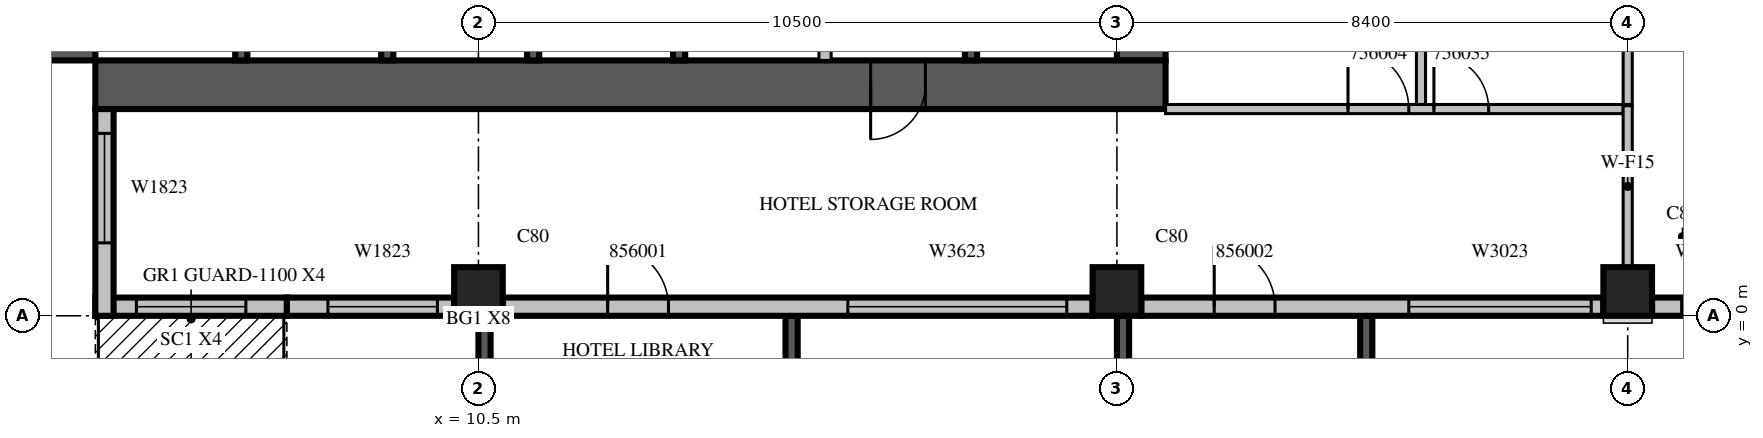
"""IFC4 building model, lengths in metres.
Left out: names, types, materials, properties, quantities, classifications, styles, units other than length and angle.
Written with IfcOpenShell. Run it as: python <this file> out.ifc"""

import sys

from ifc_helpers import new_model, si_unit, direction, frame, frame_2d, origin, origin_2d, place, context, subcontext, project, spatial, rectangle, extrude, source, transform, mapped, element, fill, save


model = new_model("IFC4")
c1 = context("Model", 3, precision=1e-05, world=origin(), true_north=direction((0.0, 1.0)))
c2 = subcontext(c1, "Body", "Model", "MODEL_VIEW")
j1 = project(units=[si_unit("LENGTHUNIT", "METRE"), si_unit("PLANEANGLEUNIT", "RADIAN")], contexts=[c1])
p1 = place(None, origin())
s1 = spatial("IfcSite", under=j1, at=p1, CompositionType="ELEMENT")
p2 = place(p1, origin())
s2 = spatial("IfcBuilding", under=s1, at=p2, CompositionType="ELEMENT")
p3 = place(p2, frame((0.0, 0.0, 246.2)))
s3 = spatial("IfcBuildingStorey", under=s2, at=p3, CompositionType="ELEMENT", Elevation=246.2)
m1 = source(origin(), c2, "Body", "SweptSolid", [
    extrude(rectangle(XDim=0.8, YDim=0.8, at=origin_2d()), origin(), (0.0, 0.0, 1.0), 3.8),
])
for number, where, z_axis, x_axis in (
    (1, (10.5, 0.4, 0.0), (0.0, 0.0, 1.0), (1.0, 0.0, 0.0)),
    (2, (21.0, 0.4, 0.0), (0.0, 0.0, 1.0), (1.0, 0.0, 0.0)),
    (3, (29.4, 0.4, 0.0), (0.0, 0.0, 1.0), (1.0, 0.0, 0.0)),
):
    element("IfcColumn", number, at=place(p3, frame(where, z_axis=z_axis, x_axis=x_axis)), inside=s3, PredefinedType="COLUMN", context=c2, shape_type="MappedRepresentation", body=[
        mapped(m1, transform((0.0, 0.0, 0.0), scale=1.0)),
    ])
m2 = source(origin(), c2, "Body", "SweptSolid", [
    extrude(rectangle(XDim=17.6, YDim=0.8, at=frame_2d((8.8, 0.0))), origin(), (0.0, 0.0, 1.0), 3.8),
])
p4 = place(p3, frame((3.8, 4.2, 0.0), z_axis=(0.0, 0.0, 1.0), x_axis=(0.0, 1.0, 0.0)))
e4 = element("IfcWall", 4, at=p4, inside=s3, PredefinedType="SHEAR", context=c2, shape_type="MappedRepresentation", body=[
    mapped(m2, transform((0.0, 0.0, 0.0), scale=1.0)),
])
m3 = source(origin(), c2, "Body", "SweptSolid", [
    extrude(rectangle(XDim=2.2, YDim=2.1, at=frame_2d((1.1, 1.05))), frame((0.0, 0.41, 0.0), z_axis=(0.0, -1.0, 0.0), x_axis=(1.0, 0.0, 0.0)), (0.0, 0.0, 1.0), 0.82),
])
p5 = place(p4, frame((4.2, 0.0, 0.0)))
e5 = element("IfcOpeningElement", 5, at=p5, cuts=e4, PredefinedType="OPENING", context=c2, shape_type="MappedRepresentation", body=[
    mapped(m3, transform((0.0, 0.0, 0.0), scale=1.0)),
])
m4 = source(origin(), c2, "Body", "SweptSolid", [
    extrude(rectangle(XDim=0.9, YDim=2.1, at=frame_2d((0.45, 1.05))), frame((0.0, 0.41, 0.0), z_axis=(0.0, -1.0, 0.0), x_axis=(1.0, 0.0, 0.0)), (0.0, 0.0, 1.0), 0.82),
])
p6 = place(p4, frame((10.95, 0.0, 0.0)))
e6 = element("IfcOpeningElement", 6, at=p6, cuts=e4, PredefinedType="OPENING", context=c2, shape_type="MappedRepresentation", body=[
    mapped(m4, transform((0.0, 0.0, 0.0), scale=1.0)),
])
m5 = source(origin(), c2, "Body", "SweptSolid", [
    extrude(rectangle(XDim=16.8, YDim=0.8, at=frame_2d((8.4, 0.0))), origin(), (0.0, 0.0, 1.0), 3.8),
])
p7 = place(p3, frame((21.4, 4.2, 0.0), z_axis=(0.0, 0.0, 1.0), x_axis=(0.0, 1.0, 0.0)))
e7 = element("IfcWall", 7, at=p7, inside=s3, PredefinedType="SHEAR", context=c2, shape_type="MappedRepresentation", body=[
    mapped(m5, transform((0.0, 0.0, 0.0), scale=1.0)),
])
p8 = place(p7, frame((4.2, 0.0, 0.0)))
e8 = element("IfcOpeningElement", 8, at=p8, cuts=e7, PredefinedType="OPENING", context=c2, shape_type="MappedRepresentation", body=[
    mapped(m3, transform((0.0, 0.0, 0.0), scale=1.0)),
])
m6 = source(origin(), c2, "Body", "SweptSolid", [
    extrude(rectangle(XDim=1.2, YDim=2.1, at=frame_2d((0.6, 1.05))), frame((0.0, 0.41, 0.0), z_axis=(0.0, -1.0, 0.0), x_axis=(1.0, 0.0, 0.0)), (0.0, 0.0, 1.0), 0.82),
])
p9 = place(p7, frame((14.7, 0.0, 0.0)))
e9 = element("IfcOpeningElement", 9, at=p9, cuts=e7, PredefinedType="OPENING", context=c2, shape_type="MappedRepresentation", body=[
    mapped(m6, transform((0.0, 0.0, 0.0), scale=1.0)),
])
p10 = place(p3, frame((4.2, 3.8, 0.0), z_axis=(0.0, 0.0, 1.0), x_axis=(1.0, 0.0, 0.0)))
e10 = element("IfcWall", 10, at=p10, inside=s3, PredefinedType="SHEAR", context=c2, shape_type="MappedRepresentation", body=[
    mapped(m2, transform((0.0, 0.0, 0.0), scale=1.0)),
])
p11 = place(p10, frame((12.75, 0.0, 0.0)))
e11 = element("IfcOpeningElement", 11, at=p11, cuts=e10, PredefinedType="OPENING", context=c2, shape_type="MappedRepresentation", body=[
    mapped(m4, transform((0.0, 0.0, 0.0), scale=1.0)),
])
m7 = source(origin(), c2, "Body", "SweptSolid", [
    extrude(rectangle(XDim=3.9, YDim=0.2, at=frame_2d((1.95, 0.0))), origin(), (0.0, 0.0, 1.0), 3.4),
])
p12 = place(p3, frame((10.6, 0.0, 0.0), z_axis=(0.0, 0.0, 1.0), x_axis=(0.0, -1.0, 0.0)))
e12 = element("IfcWall", 12, at=p12, inside=s3, PredefinedType="SOLIDWALL", context=c2, shape_type="MappedRepresentation", body=[
    mapped(m7, transform((0.0, 0.0, 0.0), scale=1.0)),
])
m8 = source(origin(), c2, "Body", "SweptSolid", [
    extrude(rectangle(XDim=2.4, YDim=2.3, at=frame_2d((1.2, 1.15))), frame((0.0, 0.11, 0.0), z_axis=(0.0, -1.0, 0.0), x_axis=(1.0, 0.0, 0.0)), (0.0, 0.0, 1.0), 0.22),
])
p13 = place(p12, frame((0.75, 0.0, 0.6)))
e13 = element("IfcOpeningElement", 13, at=p13, cuts=e12, PredefinedType="OPENING", context=c2, shape_type="MappedRepresentation", body=[
    mapped(m8, transform((0.0, 0.0, 0.0), scale=1.0)),
])
p14 = place(p3, frame((15.65, 0.0, 0.0), z_axis=(0.0, 0.0, 1.0), x_axis=(0.0, -1.0, 0.0)))
e14 = element("IfcWall", 14, at=p14, inside=s3, PredefinedType="SOLIDWALL", context=c2, shape_type="MappedRepresentation", body=[
    mapped(m7, transform((0.0, 0.0, 0.0), scale=1.0)),
])
p15 = place(p14, frame((0.75, 0.0, 0.6)))
e15 = element("IfcOpeningElement", 15, at=p15, cuts=e14, PredefinedType="OPENING", context=c2, shape_type="MappedRepresentation", body=[
    mapped(m8, transform((0.0, 0.0, 0.0), scale=1.0)),
])
p16 = place(p3, frame((21.1, 0.0, 0.0), z_axis=(0.0, 0.0, 1.0), x_axis=(0.0, -1.0, 0.0)))
e16 = element("IfcWall", 16, at=p16, inside=s3, PredefinedType="SOLIDWALL", context=c2, shape_type="MappedRepresentation", body=[
    mapped(m7, transform((0.0, 0.0, 0.0), scale=1.0)),
])
p17 = place(p16, frame((0.75, 0.0, 0.6)))
e17 = element("IfcOpeningElement", 17, at=p17, cuts=e16, PredefinedType="OPENING", context=c2, shape_type="MappedRepresentation", body=[
    mapped(m8, transform((0.0, 0.0, 0.0), scale=1.0)),
])
p18 = place(p3, frame((25.1, 0.0, 0.0), z_axis=(0.0, 0.0, 1.0), x_axis=(0.0, -1.0, 0.0)))
e18 = element("IfcWall", 18, at=p18, inside=s3, PredefinedType="SOLIDWALL", context=c2, shape_type="MappedRepresentation", body=[
    mapped(m7, transform((0.0, 0.0, 0.0), scale=1.0)),
])
p19 = place(p18, frame((0.75, 0.0, 0.6)))
e19 = element("IfcOpeningElement", 19, at=p19, cuts=e18, PredefinedType="OPENING", context=c2, shape_type="MappedRepresentation", body=[
    mapped(m8, transform((0.0, 0.0, 0.0), scale=1.0)),
])
m9 = source(origin(), c2, "Body", "SweptSolid", [
    extrude(rectangle(XDim=3.15, YDim=0.3, at=frame_2d((1.575, 0.0))), origin(), (0.0, 0.0, 1.0), 3.4),
])
p20 = place(p3, frame((4.2, 0.15, 0.0), z_axis=(0.0, 0.0, 1.0), x_axis=(1.0, 0.0, 0.0)))
e20 = element("IfcWall", 20, at=p20, inside=s3, PredefinedType="STANDARD", context=c2, shape_type="MappedRepresentation", body=[
    mapped(m9, transform((0.0, 0.0, 0.0), scale=1.0)),
])
m10 = source(origin(), c2, "Body", "SweptSolid", [
    extrude(rectangle(XDim=1.8, YDim=2.4, at=frame_2d((0.9, 1.2))), frame((0.0, 0.16, 0.0), z_axis=(0.0, -1.0, 0.0), x_axis=(1.0, 0.0, 0.0)), (0.0, 0.0, 1.0), 0.32),
])
p21 = place(p20, frame((0.675, 0.0, 0.0)))
e21 = element("IfcOpeningElement", 21, at=p21, cuts=e20, PredefinedType="OPENING", context=c2, shape_type="MappedRepresentation", body=[
    mapped(m10, transform((0.0, 0.0, 0.0), scale=1.0)),
])
m11 = source(origin(), c2, "Body", "SweptSolid", [
    extrude(rectangle(XDim=2.75, YDim=0.3, at=frame_2d((1.375, 0.0))), origin(), (0.0, 0.0, 1.0), 3.4),
])
p22 = place(p3, frame((7.35, 0.15, 0.0), z_axis=(0.0, 0.0, 1.0), x_axis=(1.0, 0.0, 0.0)))
e22 = element("IfcWall", 22, at=p22, inside=s3, PredefinedType="STANDARD", context=c2, shape_type="MappedRepresentation", body=[
    mapped(m11, transform((0.0, 0.0, 0.0), scale=1.0)),
])
m12 = source(origin(), c2, "Body", "SweptSolid", [
    extrude(rectangle(XDim=1.8, YDim=2.3, at=frame_2d((0.9, 1.15))), frame((0.0, 0.16, 0.0), z_axis=(0.0, -1.0, 0.0), x_axis=(1.0, 0.0, 0.0)), (0.0, 0.0, 1.0), 0.32),
])
p23 = place(p22, frame((0.675, 0.0, 0.6)))
e23 = element("IfcOpeningElement", 23, at=p23, cuts=e22, PredefinedType="OPENING", context=c2, shape_type="MappedRepresentation", body=[
    mapped(m12, transform((0.0, 0.0, 0.0), scale=1.0)),
])
m13 = source(origin(), c2, "Body", "SweptSolid", [
    extrude(rectangle(XDim=9.7, YDim=0.3, at=frame_2d((4.85, 0.0))), origin(), (0.0, 0.0, 1.0), 3.4),
])
p24 = place(p3, frame((10.9, 0.15, 0.0), z_axis=(0.0, 0.0, 1.0), x_axis=(1.0, 0.0, 0.0)))
e24 = element("IfcWall", 24, at=p24, inside=s3, PredefinedType="STANDARD", context=c2, shape_type="MappedRepresentation", body=[
    mapped(m13, transform((0.0, 0.0, 0.0), scale=1.0)),
])
m14 = source(origin(), c2, "Body", "SweptSolid", [
    extrude(rectangle(XDim=3.6, YDim=2.3, at=frame_2d((1.8, 1.15))), frame((0.0, 0.16, 0.0), z_axis=(0.0, -1.0, 0.0), x_axis=(1.0, 0.0, 0.0)), (0.0, 0.0, 1.0), 0.32),
])
p25 = place(p24, frame((5.675, 0.0, 0.6)))
e25 = element("IfcOpeningElement", 25, at=p25, cuts=e24, PredefinedType="OPENING", context=c2, shape_type="MappedRepresentation", body=[
    mapped(m14, transform((0.0, 0.0, 0.0), scale=1.0)),
])
m15 = source(origin(), c2, "Body", "SweptSolid", [
    extrude(rectangle(XDim=1.0, YDim=2.1, at=frame_2d((0.5, 1.05))), frame((0.0, 0.16, 0.0), z_axis=(0.0, -1.0, 0.0), x_axis=(1.0, 0.0, 0.0)), (0.0, 0.0, 1.0), 0.32),
])
p26 = place(p24, frame((1.725, 0.0, 0.0)))
e26 = element("IfcOpeningElement", 26, at=p26, cuts=e24, PredefinedType="OPENING", context=c2, shape_type="MappedRepresentation", body=[
    mapped(m15, transform((0.0, 0.0, 0.0), scale=1.0)),
])
m16 = source(origin(), c2, "Body", "SweptSolid", [
    extrude(rectangle(XDim=7.6, YDim=0.3, at=frame_2d((3.8, 0.0))), origin(), (0.0, 0.0, 1.0), 3.4),
])
p27 = place(p3, frame((21.4, 0.15, 0.0), z_axis=(0.0, 0.0, 1.0), x_axis=(1.0, 0.0, 0.0)))
e27 = element("IfcWall", 27, at=p27, inside=s3, PredefinedType="STANDARD", context=c2, shape_type="MappedRepresentation", body=[
    mapped(m16, transform((0.0, 0.0, 0.0), scale=1.0)),
])
m17 = source(origin(), c2, "Body", "SweptSolid", [
    extrude(rectangle(XDim=3.0, YDim=2.3, at=frame_2d((1.5, 1.15))), frame((0.0, 0.16, 0.0), z_axis=(0.0, -1.0, 0.0), x_axis=(1.0, 0.0, 0.0)), (0.0, 0.0, 1.0), 0.32),
])
p28 = place(p27, frame((4.4, 0.0, 0.6)))
e28 = element("IfcOpeningElement", 28, at=p28, cuts=e27, PredefinedType="OPENING", context=c2, shape_type="MappedRepresentation", body=[
    mapped(m17, transform((0.0, 0.0, 0.0), scale=1.0)),
])
p29 = place(p27, frame((1.2, 0.0, 0.0)))
e29 = element("IfcOpeningElement", 29, at=p29, cuts=e27, PredefinedType="OPENING", context=c2, shape_type="MappedRepresentation", body=[
    mapped(m15, transform((0.0, 0.0, 0.0), scale=1.0)),
])
p30 = place(p3, frame((29.8, 0.15, 0.0), z_axis=(0.0, 0.0, 1.0), x_axis=(1.0, 0.0, 0.0)))
e30 = element("IfcWall", 30, at=p30, inside=s3, PredefinedType="STANDARD", context=c2, shape_type="MappedRepresentation", body=[
    mapped(m16, transform((0.0, 0.0, 0.0), scale=1.0)),
])
m18 = source(origin(), c2, "Body", "SweptSolid", [
    extrude(rectangle(XDim=1.2, YDim=2.3, at=frame_2d((0.6, 1.15))), frame((0.0, 0.16, 0.0), z_axis=(0.0, -1.0, 0.0), x_axis=(1.0, 0.0, 0.0)), (0.0, 0.0, 1.0), 0.32),
])
p31 = place(p30, frame((0.487, 0.0, 0.6)))
e31 = element("IfcOpeningElement", 31, at=p31, cuts=e30, PredefinedType="OPENING", context=c2, shape_type="MappedRepresentation", body=[
    mapped(m18, transform((0.0, 0.0, 0.0), scale=1.0)),
])
p32 = place(p30, frame((6.013, 0.0, 0.6)))
e32 = element("IfcOpeningElement", 32, at=p32, cuts=e30, PredefinedType="OPENING", context=c2, shape_type="MappedRepresentation", body=[
    mapped(m18, transform((0.0, 0.0, 0.0), scale=1.0)),
])
m19 = source(origin(), c2, "Body", "SweptSolid", [
    extrude(rectangle(XDim=2.4, YDim=2.3, at=frame_2d((1.2, 1.15))), frame((0.0, 0.16, 0.0), z_axis=(0.0, -1.0, 0.0), x_axis=(1.0, 0.0, 0.0)), (0.0, 0.0, 1.0), 0.32),
])
p33 = place(p30, frame((2.65, 0.0, 0.6)))
e33 = element("IfcOpeningElement", 33, at=p33, cuts=e30, PredefinedType="OPENING", context=c2, shape_type="MappedRepresentation", body=[
    mapped(m19, transform((0.0, 0.0, 0.0), scale=1.0)),
])
m20 = source(origin(), c2, "Body", "SweptSolid", [
    extrude(rectangle(XDim=3.4, YDim=0.3, at=frame_2d((1.7, 0.0))), origin(), (0.0, 0.0, 1.0), 3.4),
])
p34 = place(p3, frame((4.35, 3.4, 0.0), z_axis=(0.0, 0.0, 1.0), x_axis=(0.0, -1.0, 0.0)))
e34 = element("IfcWall", 34, at=p34, inside=s3, PredefinedType="STANDARD", context=c2, shape_type="MappedRepresentation", body=[
    mapped(m20, transform((0.0, 0.0, 0.0), scale=1.0)),
])
p35 = place(p34, frame((0.4, 0.0, 0.6)))
e35 = element("IfcOpeningElement", 35, at=p35, cuts=e34, PredefinedType="OPENING", context=c2, shape_type="MappedRepresentation", body=[
    mapped(m12, transform((0.0, 0.0, 0.0), scale=1.0)),
])
m21 = source(origin(), c2, "Body", "SweptSolid", [
    extrude(rectangle(XDim=3.1, YDim=0.2, at=frame_2d((1.55, 0.0))), origin(), (0.0, 0.0, 1.0), 3.8),
])
for number, where, z_axis, x_axis in (
    (36, (6.6, 4.2, 0.0), (0.0, 0.0, 1.0), (0.0, 1.0, 0.0)),
    (37, (9.0, 4.2, 0.0), (0.0, 0.0, 1.0), (0.0, 1.0, 0.0)),
    (38, (11.4, 4.2, 0.0), (0.0, 0.0, 1.0), (0.0, 1.0, 0.0)),
):
    element("IfcWall", number, at=place(p3, frame(where, z_axis=z_axis, x_axis=x_axis)), inside=s3, PredefinedType="SOLIDWALL", context=c2, shape_type="MappedRepresentation", body=[
        mapped(m21, transform((0.0, 0.0, 0.0), scale=1.0)),
    ])
m22 = source(origin(), c2, "Body", "SweptSolid", [
    extrude(rectangle(XDim=3.1, YDim=0.2, at=frame_2d((1.55, 0.0))), origin(), (0.0, 0.0, 1.0), 3.4),
])
for number, where, z_axis, x_axis in (
    (39, (13.8, 4.2, 0.0), (0.0, 0.0, 1.0), (0.0, 1.0, 0.0)),
    (40, (18.6, 4.2, 0.0), (0.0, 0.0, 1.0), (0.0, 1.0, 0.0)),
):
    element("IfcWall", number, at=place(p3, frame(where, z_axis=z_axis, x_axis=x_axis)), inside=s3, PredefinedType="SOLIDWALL", context=c2, shape_type="MappedRepresentation", body=[
        mapped(m22, transform((0.0, 0.0, 0.0), scale=1.0)),
    ])
m23 = source(origin(), c2, "Body", "SweptSolid", [
    extrude(rectangle(XDim=3.1, YDim=0.2, at=frame_2d((1.55, 0.0))), origin(), (0.0, 0.0, 1.0), 3.4),
])
p36 = place(p3, frame((16.2, 4.2, 0.0), z_axis=(0.0, 0.0, 1.0), x_axis=(0.0, 1.0, 0.0)))
e41 = element("IfcWall", 41, at=p36, inside=s3, PredefinedType="PARTITIONING", context=c2, shape_type="MappedRepresentation", body=[
    mapped(m23, transform((0.0, 0.0, 0.0), scale=1.0)),
])
m24 = source(origin(), c2, "Body", "SweptSolid", [
    extrude(rectangle(XDim=11.525, YDim=0.15, at=frame_2d((5.763, 0.0))), origin(), (0.0, 0.0, 1.0), 3.4),
])
p37 = place(p3, frame((26.0, 15.0, 0.0), z_axis=(0.0, 0.0, 1.0), x_axis=(0.0, -1.0, 0.0)))
e42 = element("IfcWall", 42, at=p37, inside=s3, PredefinedType="PARTITIONING", context=c2, shape_type="MappedRepresentation", body=[
    mapped(m24, transform((0.0, 0.0, 0.0), scale=1.0)),
])
m25 = source(origin(), c2, "Body", "SweptSolid", [
    extrude(rectangle(XDim=0.9, YDim=2.1, at=frame_2d((0.45, 1.05))), frame((0.0, 0.085, 0.0), z_axis=(0.0, -1.0, 0.0), x_axis=(1.0, 0.0, 0.0)), (0.0, 0.0, 1.0), 0.17),
])
p38 = place(p37, frame((8.162, 0.0, 0.0)))
e43 = element("IfcOpeningElement", 43, at=p38, cuts=e42, PredefinedType="OPENING", context=c2, shape_type="MappedRepresentation", body=[
    mapped(m25, transform((0.0, 0.0, 0.0), scale=1.0)),
])
p39 = place(p37, frame((1.525, 0.0, 0.0)))
e44 = element("IfcOpeningElement", 44, at=p39, cuts=e42, PredefinedType="OPENING", context=c2, shape_type="MappedRepresentation", body=[
    mapped(m25, transform((0.0, 0.0, 0.0), scale=1.0)),
])
m26 = source(origin(), c2, "Body", "SweptSolid", [
    extrude(rectangle(XDim=6.626, YDim=0.15, at=frame_2d((3.313, 0.0))), origin(), (0.0, 0.0, 1.0), 3.4),
])
p40 = place(p3, frame((29.4, 3.475, 0.0), z_axis=(0.0, 0.0, 1.0), x_axis=(0.0, 1.0, 0.0)))
e45 = element("IfcWall", 45, at=p40, inside=s3, PredefinedType="PARTITIONING", context=c2, shape_type="MappedRepresentation", body=[
    mapped(m26, transform((0.0, 0.0, 0.0), scale=1.0)),
])
m27 = source(origin(), c2, "Body", "SweptSolid", [
    extrude(rectangle(XDim=7.525, YDim=0.15, at=frame_2d((3.763, 0.0))), origin(), (0.0, 0.0, 1.0), 3.4),
])
p41 = place(p3, frame((21.8, 3.4, 0.0), z_axis=(0.0, 0.0, 1.0), x_axis=(1.0, 0.0, 0.0)))
e46 = element("IfcWall", 46, at=p41, inside=s3, PredefinedType="PARTITIONING", context=c2, shape_type="MappedRepresentation", body=[
    mapped(m27, transform((0.0, 0.0, 0.0), scale=1.0)),
])
m28 = source(origin(), c2, "Body", "SweptSolid", [
    extrude(rectangle(XDim=1.0, YDim=2.1, at=frame_2d((0.5, 1.05))), frame((0.0, 0.085, 0.0), z_axis=(0.0, -1.0, 0.0), x_axis=(1.0, 0.0, 0.0)), (0.0, 0.0, 1.0), 0.17),
])
p42 = place(p41, frame((3.0, 0.0, 0.0)))
e47 = element("IfcOpeningElement", 47, at=p42, cuts=e46, PredefinedType="OPENING", context=c2, shape_type="MappedRepresentation", body=[
    mapped(m28, transform((0.0, 0.0, 0.0), scale=1.0)),
])
p43 = place(p41, frame((4.413, 0.0, 0.0)))
e48 = element("IfcOpeningElement", 48, at=p43, cuts=e46, PredefinedType="OPENING", context=c2, shape_type="MappedRepresentation", body=[
    mapped(m25, transform((0.0, 0.0, 0.0), scale=1.0)),
])
m29 = source(origin(), c2, "Body", "SweptSolid", [
    extrude(rectangle(XDim=2.656, YDim=0.15, at=frame_2d((1.328, 0.0))), origin(), (0.0, 0.0, 1.0), 3.4),
])
p44 = place(p3, frame((29.4, 0.799, 0.0), z_axis=(0.0, 0.0, 1.0), x_axis=(0.0, 1.0, 0.0)))
e49 = element("IfcWall", 49, at=p44, inside=s3, PredefinedType="PARTITIONING", context=c2, shape_type="MappedRepresentation", body=[
    mapped(m29, transform((0.0, 0.0, 0.0), scale=1.0)),
])
m30 = source(origin(), c2, "Body", "SweptSolid", [
    extrude(rectangle(XDim=1.8, YDim=2.4, at=frame_2d((0.9, 1.2))), frame((0.0, 0.025, 0.0), z_axis=(0.0, -1.0, 0.0), x_axis=(1.0, 0.0, 0.0)), (0.0, 0.0, 1.0), 0.05),
])
p45 = place(p21, origin())
e50 = element("IfcDoor", 50, at=p45, inside=s3, OperationType="SLIDING_TO_LEFT", PredefinedType="DOOR", context=c2, shape_type="MappedRepresentation", body=[
    mapped(m30, transform((0.0, 0.0, 0.0), scale=1.0)),
])
fill(e21, e50)
m31 = source(origin(), c2, "Body", "SweptSolid", [
    extrude(rectangle(XDim=1.8, YDim=2.3, at=frame_2d((0.9, 1.15))), frame((0.0, 0.03, 0.0), z_axis=(0.0, -1.0, 0.0), x_axis=(1.0, 0.0, 0.0)), (0.0, 0.0, 1.0), 0.06),
])
p46 = place(p23, origin())
e51 = element("IfcWindow", 51, at=p46, inside=s3, PartitioningType="SINGLE_PANEL", PredefinedType="WINDOW", context=c2, shape_type="MappedRepresentation", body=[
    mapped(m31, transform((0.0, 0.0, 0.0), scale=1.0)),
])
fill(e23, e51)
m32 = source(origin(), c2, "Body", "SweptSolid", [
    extrude(rectangle(XDim=3.6, YDim=2.3, at=frame_2d((1.8, 1.15))), frame((0.0, 0.03, 0.0), z_axis=(0.0, -1.0, 0.0), x_axis=(1.0, 0.0, 0.0)), (0.0, 0.0, 1.0), 0.06),
])
p47 = place(p25, origin())
e52 = element("IfcWindow", 52, at=p47, inside=s3, PartitioningType="SINGLE_PANEL", PredefinedType="WINDOW", context=c2, shape_type="MappedRepresentation", body=[
    mapped(m32, transform((0.0, 0.0, 0.0), scale=1.0)),
])
fill(e25, e52)
m33 = source(origin(), c2, "Body", "SweptSolid", [
    extrude(rectangle(XDim=3.0, YDim=2.3, at=frame_2d((1.5, 1.15))), frame((0.0, 0.03, 0.0), z_axis=(0.0, -1.0, 0.0), x_axis=(1.0, 0.0, 0.0)), (0.0, 0.0, 1.0), 0.06),
])
p48 = place(p28, origin())
e53 = element("IfcWindow", 53, at=p48, inside=s3, PartitioningType="SINGLE_PANEL", PredefinedType="WINDOW", context=c2, shape_type="MappedRepresentation", body=[
    mapped(m33, transform((0.0, 0.0, 0.0), scale=1.0)),
])
fill(e28, e53)
m34 = source(origin(), c2, "Body", "SweptSolid", [
    extrude(rectangle(XDim=1.2, YDim=2.3, at=frame_2d((0.6, 1.15))), frame((0.0, 0.03, 0.0), z_axis=(0.0, -1.0, 0.0), x_axis=(1.0, 0.0, 0.0)), (0.0, 0.0, 1.0), 0.06),
])
p49 = place(p31, origin())
e54 = element("IfcWindow", 54, at=p49, inside=s3, PartitioningType="SINGLE_PANEL", PredefinedType="WINDOW", context=c2, shape_type="MappedRepresentation", body=[
    mapped(m34, transform((0.0, 0.0, 0.0), scale=1.0)),
])
fill(e31, e54)
p50 = place(p35, origin())
e55 = element("IfcWindow", 55, at=p50, inside=s3, PartitioningType="SINGLE_PANEL", PredefinedType="WINDOW", context=c2, shape_type="MappedRepresentation", body=[
    mapped(m31, transform((0.0, 0.0, 0.0), scale=1.0)),
])
fill(e35, e55)
m35 = source(origin(), c2, "Body", "SweptSolid", [
    extrude(rectangle(XDim=0.9, YDim=2.1, at=frame_2d((0.45, 1.05))), frame((0.0, 0.025, 0.0), z_axis=(0.0, -1.0, 0.0), x_axis=(1.0, 0.0, 0.0)), (0.0, 0.0, 1.0), 0.05),
])
p51 = place(p11, origin())
e56 = element("IfcDoor", 56, at=p51, inside=s3, OperationType="SINGLE_SWING_RIGHT", PredefinedType="DOOR", context=c2, shape_type="MappedRepresentation", body=[
    mapped(m35, transform((0.0, 0.0, 0.0), scale=1.0)),
])
fill(e11, e56)
m36 = source(origin(), c2, "Body", "SweptSolid", [
    extrude(rectangle(XDim=1.0, YDim=2.1, at=frame_2d((0.5, 1.05))), frame((0.0, 0.025, 0.0), z_axis=(0.0, -1.0, 0.0), x_axis=(1.0, 0.0, 0.0)), (0.0, 0.0, 1.0), 0.05),
])
p52 = place(p42, origin())
e57 = element("IfcDoor", 57, at=p52, inside=s3, OperationType="SINGLE_SWING_LEFT", PredefinedType="DOOR", context=c2, shape_type="MappedRepresentation", body=[
    mapped(m36, transform((0.0, 0.0, 0.0), scale=1.0)),
])
fill(e47, e57)
p53 = place(p43, origin())
e58 = element("IfcDoor", 58, at=p53, inside=s3, OperationType="SINGLE_SWING_LEFT", PredefinedType="DOOR", context=c2, shape_type="MappedRepresentation", body=[
    mapped(m35, transform((0.0, 0.0, 0.0), scale=1.0)),
])
fill(e48, e58)
p54 = place(p26, origin())
e59 = element("IfcDoor", 59, at=p54, inside=s3, OperationType="SINGLE_SWING_LEFT", PredefinedType="DOOR", context=c2, shape_type="MappedRepresentation", body=[
    mapped(m36, transform((0.0, 0.0, 0.0), scale=1.0)),
])
fill(e26, e59)
p55 = place(p29, origin())
e60 = element("IfcDoor", 60, at=p55, inside=s3, OperationType="SINGLE_SWING_LEFT", PredefinedType="DOOR", context=c2, shape_type="MappedRepresentation", body=[
    mapped(m36, transform((0.0, 0.0, 0.0), scale=1.0)),
])
fill(e29, e60)
save(model, sys.argv[1])
